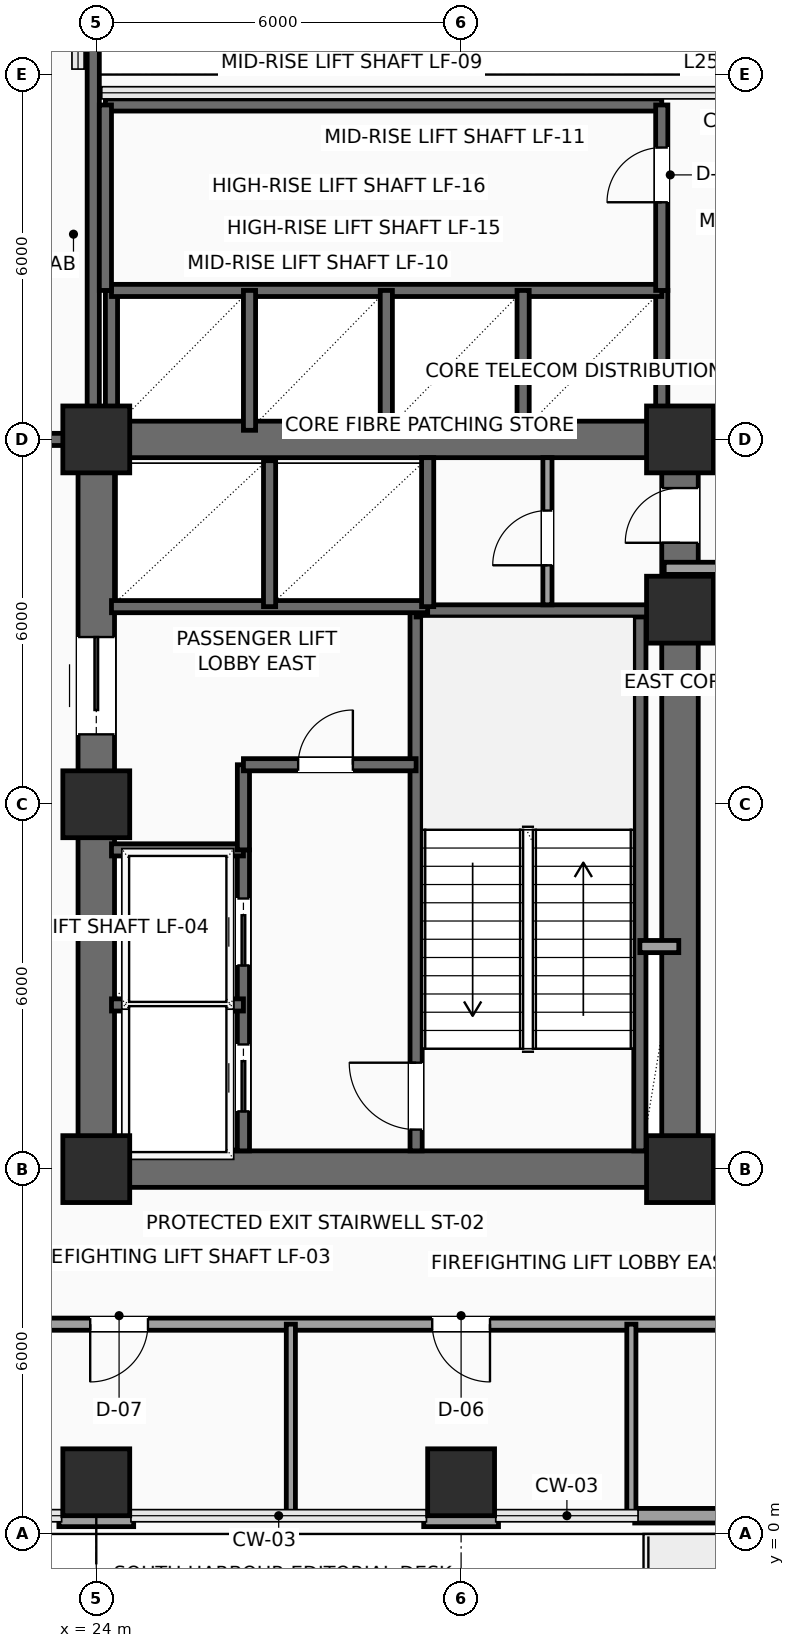
"""IFC4 building model, lengths in metres.
Left out: names, types, materials, properties, quantities, classifications, styles, units other than length and angle.
Written with IfcOpenShell. Run it as: python <this file> out.ifc"""

import sys

from ifc_helpers import new_model, si_unit, direction, frame, frame_2d, origin, origin_2d, place, context, subcontext, project, spatial, rectangle, extrude, element, fill, save


model = new_model("IFC4")
c1 = context("Model", 3, precision=1e-05, world=origin(), true_north=direction((0.0, 1.0)))
c2 = subcontext(c1, "Body", "Model", "MODEL_VIEW")
j1 = project(units=[si_unit("LENGTHUNIT", "METRE"), si_unit("PLANEANGLEUNIT", "RADIAN")], contexts=[c1])
p1 = place(None, origin())
s1 = spatial("IfcSite", under=j1, at=p1, CompositionType="ELEMENT")
p2 = place(p1, origin())
s2 = spatial("IfcBuilding", under=s1, at=p2, CompositionType="ELEMENT")
p3 = place(p2, frame((0.0, 0.0, 107.1)))
s3 = spatial("IfcBuildingStorey", under=s2, at=p3, CompositionType="ELEMENT", Elevation=107.1)
for number, where, z_axis, x_axis in (
    (1, (24.0, 6.0, 0.0), (0.0, 0.0, 1.0), (1.0, 0.0, 0.0)),
    (2, (24.0, 12.0, 0.0), (0.0, 0.0, 1.0), (1.0, 0.0, 0.0)),
    (3, (24.0, 18.0, 0.0), (0.0, 0.0, 1.0), (1.0, 0.0, 0.0)),
    (4, (33.6, 6.0, 0.0), (0.0, 0.0, 1.0), (1.0, 0.0, 0.0)),
    (5, (33.6, 15.2, 0.0), (0.0, 0.0, 1.0), (1.0, 0.0, 0.0)),
    (6, (33.6, 18.0, 0.0), (0.0, 0.0, 1.0), (1.0, 0.0, 0.0)),
    (7, (24.0, 0.85, 0.0), (0.0, 0.0, 1.0), (1.0, 0.0, 0.0)),
    (8, (30.0, 0.85, 0.0), (0.0, 0.0, 1.0), (1.0, 0.0, 0.0)),
):
    element("IfcColumn", number, at=place(p3, frame(where, z_axis=z_axis, x_axis=x_axis)), inside=s3, PredefinedType="COLUMN", context=c2, shape_type="SweptSolid", body=[
        extrude(rectangle(XDim=1.1, YDim=1.1, at=origin_2d()), origin(), (0.0, 0.0, 1.0), 3.75),
    ])
p4 = place(p3, frame((42.145, 0.3, 0.0), z_axis=(0.0, 0.0, 1.0), x_axis=(-1.0, 0.0, 0.0)))
e9 = element("IfcWall", 9, at=p4, inside=s3, PredefinedType="SOLIDWALL", context=c2, shape_type="SweptSolid", body=[
    extrude(rectangle(XDim=9.29, YDim=0.24, at=frame_2d((4.645, 0.0))), origin(), (0.0, 0.0, 1.0), 3.475),
])
p5 = place(p4, frame((4.2, 0.0, 0.0)))
e10 = element("IfcOpeningElement", 10, at=p5, cuts=e9, PredefinedType="OPENING", context=c2, shape_type="SweptSolid", body=[
    extrude(rectangle(XDim=1.05, YDim=2.2, at=frame_2d((0.525, 1.1))), frame((0.0, 0.13, 0.0), z_axis=(0.0, -1.0, 0.0), x_axis=(1.0, 0.0, 0.0)), (0.0, 0.0, 1.0), 0.26),
])
for number, where, z_axis, x_axis in (
    (11, (30.615, 0.24, 0.0), (0.0, 0.0, 1.0), (-1.0, 0.0, 0.0)),
    (12, (24.615, 0.24, 0.0), (0.0, 0.0, 1.0), (-1.0, 0.0, 0.0)),
):
    element("IfcWall", number, at=place(p3, frame(where, z_axis=z_axis, x_axis=x_axis)), inside=s3, PredefinedType="SOLIDWALL", context=c2, shape_type="SweptSolid", body=[
        extrude(rectangle(XDim=1.23, YDim=0.24, at=frame_2d((0.615, 0.0))), origin(), (0.0, 0.0, 1.0), 3.475),
    ])
for number, where, z_axis, x_axis in (
    (13, (24.0, 6.0, 0.0), (0.0, 0.0, 1.0), (1.0, 0.0, 0.0)),
    (14, (24.0, 18.0, 0.0), (0.0, 0.0, 1.0), (1.0, 0.0, 0.0)),
):
    element("IfcWall", number, at=place(p3, frame(where, z_axis=z_axis, x_axis=x_axis)), inside=s3, PredefinedType="SHEAR", context=c2, shape_type="SweptSolid", body=[
        extrude(rectangle(XDim=9.6, YDim=0.6, at=frame_2d((4.8, 0.0))), origin(), (0.0, 0.0, 1.0), 3.475),
    ])
p6 = place(p3, frame((24.0, 6.0, 0.0), z_axis=(0.0, 0.0, 1.0), x_axis=(0.0, 1.0, 0.0)))
e15 = element("IfcWall", 15, at=p6, inside=s3, PredefinedType="SHEAR", context=c2, shape_type="SweptSolid", body=[
    extrude(rectangle(XDim=12.0, YDim=0.6, at=frame_2d((6.0, 0.0))), origin(), (0.0, 0.0, 1.0), 3.475),
])
p7 = place(p6, frame((7.15, 0.0, 0.0)))
e16 = element("IfcOpeningElement", 16, at=p7, cuts=e15, PredefinedType="OPENING", context=c2, shape_type="SweptSolid", body=[
    extrude(rectangle(XDim=1.6, YDim=2.3, at=frame_2d((0.8, 1.15))), frame((0.0, 0.31, 0.0), z_axis=(0.0, -1.0, 0.0), x_axis=(1.0, 0.0, 0.0)), (0.0, 0.0, 1.0), 0.62),
])
p8 = place(p3, frame((33.6, 6.0, 0.0), z_axis=(0.0, 0.0, 1.0), x_axis=(0.0, 1.0, 0.0)))
e17 = element("IfcWall", 17, at=p8, inside=s3, PredefinedType="SHEAR", context=c2, shape_type="SweptSolid", body=[
    extrude(rectangle(XDim=12.0, YDim=0.6, at=frame_2d((6.0, 0.0))), origin(), (0.0, 0.0, 1.0), 3.475),
])
p9 = place(p8, frame((10.3, 0.0, 0.0)))
e18 = element("IfcOpeningElement", 18, at=p9, cuts=e17, PredefinedType="OPENING", context=c2, shape_type="SweptSolid", body=[
    extrude(rectangle(XDim=0.9, YDim=2.15, at=frame_2d((0.45, 1.075))), frame((0.0, 0.31, 0.0), z_axis=(0.0, -1.0, 0.0), x_axis=(1.0, 0.0, 0.0)), (0.0, 0.0, 1.0), 0.62),
])
p10 = place(p3, frame((29.26, 6.3, 0.0), z_axis=(0.0, 0.0, 1.0), x_axis=(0.0, 1.0, 0.0)))
e19 = element("IfcWall", 19, at=p10, inside=s3, PredefinedType="SHEAR", context=c2, shape_type="SweptSolid", body=[
    extrude(rectangle(XDim=8.88, YDim=0.2, at=frame_2d((4.44, 0.0))), origin(), (0.0, 0.0, 1.0), 3.475),
])
p11 = place(p10, frame((0.35, 0.0, 0.0)))
e20 = element("IfcOpeningElement", 20, at=p11, cuts=e19, PredefinedType="OPENING", context=c2, shape_type="SweptSolid", body=[
    extrude(rectangle(XDim=1.1, YDim=2.2, at=frame_2d((0.55, 1.1))), frame((0.0, 0.11, 0.0), z_axis=(0.0, -1.0, 0.0), x_axis=(1.0, 0.0, 0.0)), (0.0, 0.0, 1.0), 0.22),
])
p12 = place(p3, frame((32.94, 6.3, 0.0), z_axis=(0.0, 0.0, 1.0), x_axis=(0.0, 1.0, 0.0)))
e21 = element("IfcWall", 21, at=p12, inside=s3, PredefinedType="SHEAR", context=c2, shape_type="SweptSolid", body=[
    extrude(rectangle(XDim=8.88, YDim=0.2, at=frame_2d((4.44, 0.0))), origin(), (0.0, 0.0, 1.0), 3.475),
])
p13 = place(p3, frame((29.26, 15.18, 0.0), z_axis=(0.0, 0.0, 1.0), x_axis=(1.0, 0.0, 0.0)))
e22 = element("IfcWall", 22, at=p13, inside=s3, PredefinedType="SHEAR", context=c2, shape_type="SweptSolid", body=[
    extrude(rectangle(XDim=4.04, YDim=0.2, at=frame_2d((2.02, 0.0))), origin(), (0.0, 0.0, 1.0), 3.475),
])
p14 = place(p3, frame((26.42, 6.3, 0.0), z_axis=(0.0, 0.0, 1.0), x_axis=(0.0, 1.0, 0.0)))
e23 = element("IfcWall", 23, at=p14, inside=s3, PredefinedType="SHEAR", context=c2, shape_type="SweptSolid", body=[
    extrude(rectangle(XDim=4.95, YDim=0.2, at=frame_2d((2.475, 0.0))), origin(), (0.0, 0.0, 1.0), 3.475),
])
p15 = place(p14, frame((0.65, 0.0, 0.0)))
e24 = element("IfcOpeningElement", 24, at=p15, cuts=e23, PredefinedType="OPENING", context=c2, shape_type="SweptSolid", body=[
    extrude(rectangle(XDim=1.1, YDim=2.2, at=frame_2d((0.55, 1.1))), frame((0.0, 0.11, 0.0), z_axis=(0.0, -1.0, 0.0), x_axis=(1.0, 0.0, 0.0)), (0.0, 0.0, 1.0), 0.22),
])
p16 = place(p14, frame((3.05, 0.0, 0.0)))
e25 = element("IfcOpeningElement", 25, at=p16, cuts=e23, PredefinedType="OPENING", context=c2, shape_type="SweptSolid", body=[
    extrude(rectangle(XDim=1.1, YDim=2.2, at=frame_2d((0.55, 1.1))), frame((0.0, 0.11, 0.0), z_axis=(0.0, -1.0, 0.0), x_axis=(1.0, 0.0, 0.0)), (0.0, 0.0, 1.0), 0.22),
])
for number, where, z_axis, x_axis in (
    (26, (24.25, 8.7, 0.0), (0.0, 0.0, 1.0), (1.0, 0.0, 0.0)),
    (27, (24.25, 11.25, 0.0), (0.0, 0.0, 1.0), (1.0, 0.0, 0.0)),
):
    element("IfcWall", number, at=place(p3, frame(where, z_axis=z_axis, x_axis=x_axis)), inside=s3, PredefinedType="SHEAR", context=c2, shape_type="SweptSolid", body=[
        extrude(rectangle(XDim=2.17, YDim=0.2, at=frame_2d((1.085, 0.0))), origin(), (0.0, 0.0, 1.0), 3.475),
    ])
p17 = place(p3, frame((26.42, 11.25, 0.0), z_axis=(0.0, 0.0, 1.0), x_axis=(0.0, 1.0, 0.0)))
e28 = element("IfcWall", 28, at=p17, inside=s3, PredefinedType="SHEAR", context=c2, shape_type="SweptSolid", body=[
    extrude(rectangle(XDim=1.4, YDim=0.2, at=frame_2d((0.7, 0.0))), origin(), (0.0, 0.0, 1.0), 3.475),
])
p18 = place(p3, frame((26.42, 12.65, 0.0), z_axis=(0.0, 0.0, 1.0), x_axis=(1.0, 0.0, 0.0)))
e29 = element("IfcWall", 29, at=p18, inside=s3, PredefinedType="SHEAR", context=c2, shape_type="SweptSolid", body=[
    extrude(rectangle(XDim=2.84, YDim=0.2, at=frame_2d((1.42, 0.0))), origin(), (0.0, 0.0, 1.0), 3.475),
])
p19 = place(p18, frame((0.9, 0.0, 0.0)))
e30 = element("IfcOpeningElement", 30, at=p19, cuts=e29, PredefinedType="OPENING", context=c2, shape_type="SweptSolid", body=[
    extrude(rectangle(XDim=0.9, YDim=2.15, at=frame_2d((0.45, 1.075))), frame((0.0, 0.11, 0.0), z_axis=(0.0, -1.0, 0.0), x_axis=(1.0, 0.0, 0.0)), (0.0, 0.0, 1.0), 0.22),
])
p20 = place(p3, frame((32.94, 9.66, 0.0), z_axis=(0.0, 0.0, 1.0), x_axis=(1.0, 0.0, 0.0)))
e31 = element("IfcWall", 31, at=p20, inside=s3, PredefinedType="SOLIDWALL", context=c2, shape_type="SweptSolid", body=[
    extrude(rectangle(XDim=0.64, YDim=0.2, at=frame_2d((0.32, 0.0))), origin(), (0.0, 0.0, 1.0), 3.475),
])
p21 = place(p3, frame((24.25, 15.25, 0.0), z_axis=(0.0, 0.0, 1.0), x_axis=(1.0, 0.0, 0.0)))
e32 = element("IfcWall", 32, at=p21, inside=s3, PredefinedType="SHEAR", context=c2, shape_type="SweptSolid", body=[
    extrude(rectangle(XDim=5.2, YDim=0.2, at=frame_2d((2.6, 0.0))), origin(), (0.0, 0.0, 1.0), 3.475),
])
p22 = place(p3, frame((26.85, 15.25, 0.0), z_axis=(0.0, 0.0, 1.0), x_axis=(0.0, 1.0, 0.0)))
e33 = element("IfcWall", 33, at=p22, inside=s3, PredefinedType="SHEAR", context=c2, shape_type="SweptSolid", body=[
    extrude(rectangle(XDim=2.4, YDim=0.2, at=frame_2d((1.2, 0.0))), origin(), (0.0, 0.0, 1.0), 3.475),
])
p23 = place(p3, frame((29.45, 15.25, 0.0), z_axis=(0.0, 0.0, 1.0), x_axis=(0.0, 1.0, 0.0)))
e34 = element("IfcWall", 34, at=p23, inside=s3, PredefinedType="SHEAR", context=c2, shape_type="SweptSolid", body=[
    extrude(rectangle(XDim=2.45, YDim=0.2, at=frame_2d((1.225, 0.0))), origin(), (0.0, 0.0, 1.0), 3.475),
])
p24 = place(p3, frame((31.42, 15.28, 0.0), z_axis=(0.0, 0.0, 1.0), x_axis=(0.0, 1.0, 0.0)))
e35 = element("IfcWall", 35, at=p24, inside=s3, PredefinedType="PARTITIONING", context=c2, shape_type="SweptSolid", body=[
    extrude(rectangle(XDim=2.42, YDim=0.15, at=frame_2d((1.21, 0.0))), origin(), (0.0, 0.0, 1.0), 3.475),
])
p25 = place(p24, frame((0.65, 0.0, 0.0)))
e36 = element("IfcOpeningElement", 36, at=p25, cuts=e35, PredefinedType="OPENING", context=c2, shape_type="SweptSolid", body=[
    extrude(rectangle(XDim=0.9, YDim=2.15, at=frame_2d((0.45, 1.075))), frame((0.0, 0.085, 0.0), z_axis=(0.0, -1.0, 0.0), x_axis=(1.0, 0.0, 0.0)), (0.0, 0.0, 1.0), 0.17),
])
p26 = place(p3, frame((20.45, 18.0, 0.0), z_axis=(0.0, 0.0, 1.0), x_axis=(1.0, 0.0, 0.0)))
e37 = element("IfcWall", 37, at=p26, inside=s3, PredefinedType="SHEAR", context=c2, shape_type="SweptSolid", body=[
    extrude(rectangle(XDim=3.5, YDim=0.2, at=frame_2d((1.75, 0.0))), origin(), (0.0, 0.0, 1.0), 3.475),
])
p27 = place(p26, frame((0.95, 0.0, 0.0)))
e38 = element("IfcOpeningElement", 38, at=p27, cuts=e37, PredefinedType="OPENING", context=c2, shape_type="SweptSolid", body=[
    extrude(rectangle(XDim=1.6, YDim=2.3, at=frame_2d((0.8, 1.15))), frame((0.0, 0.11, 0.0), z_axis=(0.0, -1.0, 0.0), x_axis=(1.0, 0.0, 0.0)), (0.0, 0.0, 1.0), 0.22),
])
p28 = place(p3, frame((23.95, 18.0, 0.0), z_axis=(0.0, 0.0, 1.0), x_axis=(0.0, 1.0, 0.0)))
e39 = element("IfcWall", 39, at=p28, inside=s3, PredefinedType="SHEAR", context=c2, shape_type="SweptSolid", body=[
    extrude(rectangle(XDim=9.3, YDim=0.2, at=frame_2d((4.65, 0.0))), origin(), (0.0, 0.0, 1.0), 3.475),
])
for number, where, z_axis, x_axis in (
    (40, (33.3, 18.1, 0.0), (0.0, 0.0, 1.0), (0.0, 1.0, 0.0)),
    (41, (24.25, 18.1, 0.0), (0.0, 0.0, 1.0), (0.0, 1.0, 0.0)),
):
    element("IfcWall", number, at=place(p3, frame(where, z_axis=z_axis, x_axis=x_axis)), inside=s3, PredefinedType="SHEAR", context=c2, shape_type="SweptSolid", body=[
        extrude(rectangle(XDim=2.35, YDim=0.2, at=frame_2d((1.175, 0.0))), origin(), (0.0, 0.0, 1.0), 3.475),
    ])
p29 = place(p3, frame((24.25, 20.45, 0.0), z_axis=(0.0, 0.0, 1.0), x_axis=(1.0, 0.0, 0.0)))
e42 = element("IfcWall", 42, at=p29, inside=s3, PredefinedType="SHEAR", context=c2, shape_type="SweptSolid", body=[
    extrude(rectangle(XDim=9.05, YDim=0.2, at=frame_2d((4.525, 0.0))), origin(), (0.0, 0.0, 1.0), 3.475),
])
for number, where, z_axis, x_axis in (
    (43, (26.52, 18.15, 0.0), (0.0, 0.0, 1.0), (0.0, 1.0, 0.0)),
    (44, (28.77, 18.15, 0.0), (0.0, 0.0, 1.0), (0.0, 1.0, 0.0)),
    (45, (31.02, 18.15, 0.0), (0.0, 0.0, 1.0), (0.0, 1.0, 0.0)),
):
    element("IfcWall", number, at=place(p3, frame(where, z_axis=z_axis, x_axis=x_axis)), inside=s3, PredefinedType="SHEAR", context=c2, shape_type="SweptSolid", body=[
        extrude(rectangle(XDim=2.3, YDim=0.2, at=frame_2d((1.15, 0.0))), origin(), (0.0, 0.0, 1.0), 3.475),
    ])
p30 = place(p3, frame((24.15, 23.5, 0.0), z_axis=(0.0, 0.0, 1.0), x_axis=(1.0, 0.0, 0.0)))
e46 = element("IfcWall", 46, at=p30, inside=s3, PredefinedType="SHEAR", context=c2, shape_type="SweptSolid", body=[
    extrude(rectangle(XDim=9.15, YDim=0.2, at=frame_2d((4.575, 0.0))), origin(), (0.0, 0.0, 1.0), 3.475),
])
p31 = place(p3, frame((33.3, 20.45, 0.0), z_axis=(0.0, 0.0, 1.0), x_axis=(0.0, 1.0, 0.0)))
e47 = element("IfcWall", 47, at=p31, inside=s3, PredefinedType="SHEAR", context=c2, shape_type="SweptSolid", body=[
    extrude(rectangle(XDim=3.05, YDim=0.2, at=frame_2d((1.525, 0.0))), origin(), (0.0, 0.0, 1.0), 3.475),
])
p32 = place(p31, frame((1.45, 0.0, 0.0)))
e48 = element("IfcOpeningElement", 48, at=p32, cuts=e47, PredefinedType="OPENING", context=c2, shape_type="SweptSolid", body=[
    extrude(rectangle(XDim=0.9, YDim=2.15, at=frame_2d((0.45, 1.075))), frame((0.0, 0.11, 0.0), z_axis=(0.0, -1.0, 0.0), x_axis=(1.0, 0.0, 0.0)), (0.0, 0.0, 1.0), 0.22),
])
p33 = place(p3, frame((24.15, 20.45, 0.0), z_axis=(0.0, 0.0, 1.0), x_axis=(0.0, 1.0, 0.0)))
e49 = element("IfcWall", 49, at=p33, inside=s3, PredefinedType="SHEAR", context=c2, shape_type="SweptSolid", body=[
    extrude(rectangle(XDim=3.05, YDim=0.2, at=frame_2d((1.525, 0.0))), origin(), (0.0, 0.0, 1.0), 3.475),
])
p34 = place(p3, frame((36.15, 15.88, 0.0), z_axis=(0.0, 0.0, 1.0), x_axis=(-1.0, 0.0, 0.0)))
e50 = element("IfcWall", 50, at=p34, inside=s3, PredefinedType="PARTITIONING", context=c2, shape_type="SweptSolid", body=[
    extrude(rectangle(XDim=2.81, YDim=0.2, at=frame_2d((1.405, 0.0))), origin(), (0.0, 0.0, 1.0), 3.475),
])
p35 = place(p3, frame((36.15, 3.45, 0.0), z_axis=(0.0, 0.0, 1.0), x_axis=(-1.0, 0.0, 0.0)))
e51 = element("IfcWall", 51, at=p35, inside=s3, PredefinedType="PARTITIONING", context=c2, shape_type="SweptSolid", body=[
    extrude(rectangle(XDim=14.6, YDim=0.2, at=frame_2d((7.3, 0.0))), origin(), (0.0, 0.0, 1.0), 3.017),
])
p36 = place(p35, frame((11.3, 0.0, 0.0)))
e52 = element("IfcOpeningElement", 52, at=p36, cuts=e51, PredefinedType="OPENING", context=c2, shape_type="SweptSolid", body=[
    extrude(rectangle(XDim=0.95, YDim=2.15, at=frame_2d((0.475, 1.075))), frame((0.0, 0.11, 0.0), z_axis=(0.0, -1.0, 0.0), x_axis=(1.0, 0.0, 0.0)), (0.0, 0.0, 1.0), 0.22),
])
p37 = place(p35, frame((5.675, 0.0, 0.0)))
e53 = element("IfcOpeningElement", 53, at=p37, cuts=e51, PredefinedType="OPENING", context=c2, shape_type="SweptSolid", body=[
    extrude(rectangle(XDim=0.95, YDim=2.15, at=frame_2d((0.475, 1.075))), frame((0.0, 0.11, 0.0), z_axis=(0.0, -1.0, 0.0), x_axis=(1.0, 0.0, 0.0)), (0.0, 0.0, 1.0), 0.22),
])
for number, where, z_axis, x_axis in (
    (54, (27.2, 0.3, 0.0), (0.0, 0.0, 1.0), (0.0, 1.0, 0.0)),
    (55, (32.8, 0.3, 0.0), (0.0, 0.0, 1.0), (0.0, 1.0, 0.0)),
):
    element("IfcWall", number, at=place(p3, frame(where, z_axis=z_axis, x_axis=x_axis)), inside=s3, PredefinedType="PARTITIONING", context=c2, shape_type="SweptSolid", body=[
        extrude(rectangle(XDim=3.15, YDim=0.15, at=frame_2d((1.575, 0.0))), origin(), (0.0, 0.0, 1.0), 3.475),
    ])
p38 = place(p3, frame((33.65, 5.8, 0.0), z_axis=(0.0, 0.0, 1.0), x_axis=(1.0, 0.0, 0.0)))
e56 = element("IfcWall", 56, at=p38, inside=s3, PredefinedType="PARTITIONING", context=c2, shape_type="SweptSolid", body=[
    extrude(rectangle(XDim=2.5, YDim=0.15, at=frame_2d((1.25, 0.0))), origin(), (0.0, 0.0, 1.0), 2.967),
])
p39 = place(p7, origin())
e57 = element("IfcDoor", 57, at=p39, inside=s3, OperationType="DOUBLE_DOOR_SLIDING", PredefinedType="DOOR", context=c2, shape_type="SweptSolid", body=[
    extrude(rectangle(XDim=1.6, YDim=2.3, at=frame_2d((0.8, 1.15))), frame((0.0, 0.025, 0.0), z_axis=(0.0, -1.0, 0.0), x_axis=(1.0, 0.0, 0.0)), (0.0, 0.0, 1.0), 0.05),
])
fill(e16, e57)
p40 = place(p9, origin())
e58 = element("IfcDoor", 58, at=p40, inside=s3, OperationType="SINGLE_SWING_LEFT", PredefinedType="DOOR", context=c2, shape_type="SweptSolid", body=[
    extrude(rectangle(XDim=0.9, YDim=2.15, at=frame_2d((0.45, 1.075))), frame((0.0, 0.025, 0.0), z_axis=(0.0, -1.0, 0.0), x_axis=(1.0, 0.0, 0.0)), (0.0, 0.0, 1.0), 0.05),
])
fill(e18, e58)
p41 = place(p11, origin())
e59 = element("IfcDoor", 59, at=p41, inside=s3, OperationType="SINGLE_SWING_RIGHT", PredefinedType="DOOR", context=c2, shape_type="SweptSolid", body=[
    extrude(rectangle(XDim=1.1, YDim=2.2, at=frame_2d((0.55, 1.1))), frame((0.0, 0.025, 0.0), z_axis=(0.0, -1.0, 0.0), x_axis=(1.0, 0.0, 0.0)), (0.0, 0.0, 1.0), 0.05),
])
fill(e20, e59)
p42 = place(p15, origin())
e60 = element("IfcDoor", 60, at=p42, inside=s3, OperationType="SLIDING_TO_LEFT", PredefinedType="DOOR", context=c2, shape_type="SweptSolid", body=[
    extrude(rectangle(XDim=1.1, YDim=2.2, at=frame_2d((0.55, 1.1))), frame((0.0, 0.025, 0.0), z_axis=(0.0, -1.0, 0.0), x_axis=(1.0, 0.0, 0.0)), (0.0, 0.0, 1.0), 0.05),
])
fill(e24, e60)
p43 = place(p16, origin())
e61 = element("IfcDoor", 61, at=p43, inside=s3, OperationType="SLIDING_TO_LEFT", PredefinedType="DOOR", context=c2, shape_type="SweptSolid", body=[
    extrude(rectangle(XDim=1.1, YDim=2.2, at=frame_2d((0.55, 1.1))), frame((0.0, 0.025, 0.0), z_axis=(0.0, -1.0, 0.0), x_axis=(1.0, 0.0, 0.0)), (0.0, 0.0, 1.0), 0.05),
])
fill(e25, e61)
p44 = place(p19, origin())
e62 = element("IfcDoor", 62, at=p44, inside=s3, OperationType="SINGLE_SWING_RIGHT", PredefinedType="DOOR", context=c2, shape_type="SweptSolid", body=[
    extrude(rectangle(XDim=0.9, YDim=2.15, at=frame_2d((0.45, 1.075))), frame((0.0, 0.025, 0.0), z_axis=(0.0, -1.0, 0.0), x_axis=(1.0, 0.0, 0.0)), (0.0, 0.0, 1.0), 0.05),
])
fill(e30, e62)
p45 = place(p25, origin())
e63 = element("IfcDoor", 63, at=p45, inside=s3, OperationType="SINGLE_SWING_LEFT", PredefinedType="DOOR", context=c2, shape_type="SweptSolid", body=[
    extrude(rectangle(XDim=0.9, YDim=2.15, at=frame_2d((0.45, 1.075))), frame((0.0, 0.025, 0.0), z_axis=(0.0, -1.0, 0.0), x_axis=(1.0, 0.0, 0.0)), (0.0, 0.0, 1.0), 0.05),
])
fill(e36, e63)
p46 = place(p32, origin())
e64 = element("IfcDoor", 64, at=p46, inside=s3, OperationType="SINGLE_SWING_LEFT", PredefinedType="DOOR", context=c2, shape_type="SweptSolid", body=[
    extrude(rectangle(XDim=0.9, YDim=2.15, at=frame_2d((0.45, 1.075))), frame((0.0, 0.025, 0.0), z_axis=(0.0, -1.0, 0.0), x_axis=(1.0, 0.0, 0.0)), (0.0, 0.0, 1.0), 0.05),
])
fill(e48, e64)
p47 = place(p36, origin())
e65 = element("IfcDoor", 65, at=p47, inside=s3, OperationType="SINGLE_SWING_RIGHT", PredefinedType="DOOR", context=c2, shape_type="SweptSolid", body=[
    extrude(rectangle(XDim=0.95, YDim=2.15, at=frame_2d((0.475, 1.075))), frame((0.0, 0.025, 0.0), z_axis=(0.0, -1.0, 0.0), x_axis=(1.0, 0.0, 0.0)), (0.0, 0.0, 1.0), 0.05),
])
fill(e52, e65)
p48 = place(p37, origin())
e66 = element("IfcDoor", 66, at=p48, inside=s3, OperationType="SINGLE_SWING_LEFT", PredefinedType="DOOR", context=c2, shape_type="SweptSolid", body=[
    extrude(rectangle(XDim=0.95, YDim=2.15, at=frame_2d((0.475, 1.075))), frame((0.0, 0.025, 0.0), z_axis=(0.0, -1.0, 0.0), x_axis=(1.0, 0.0, 0.0)), (0.0, 0.0, 1.0), 0.05),
])
fill(e53, e66)
save(model, sys.argv[1])
